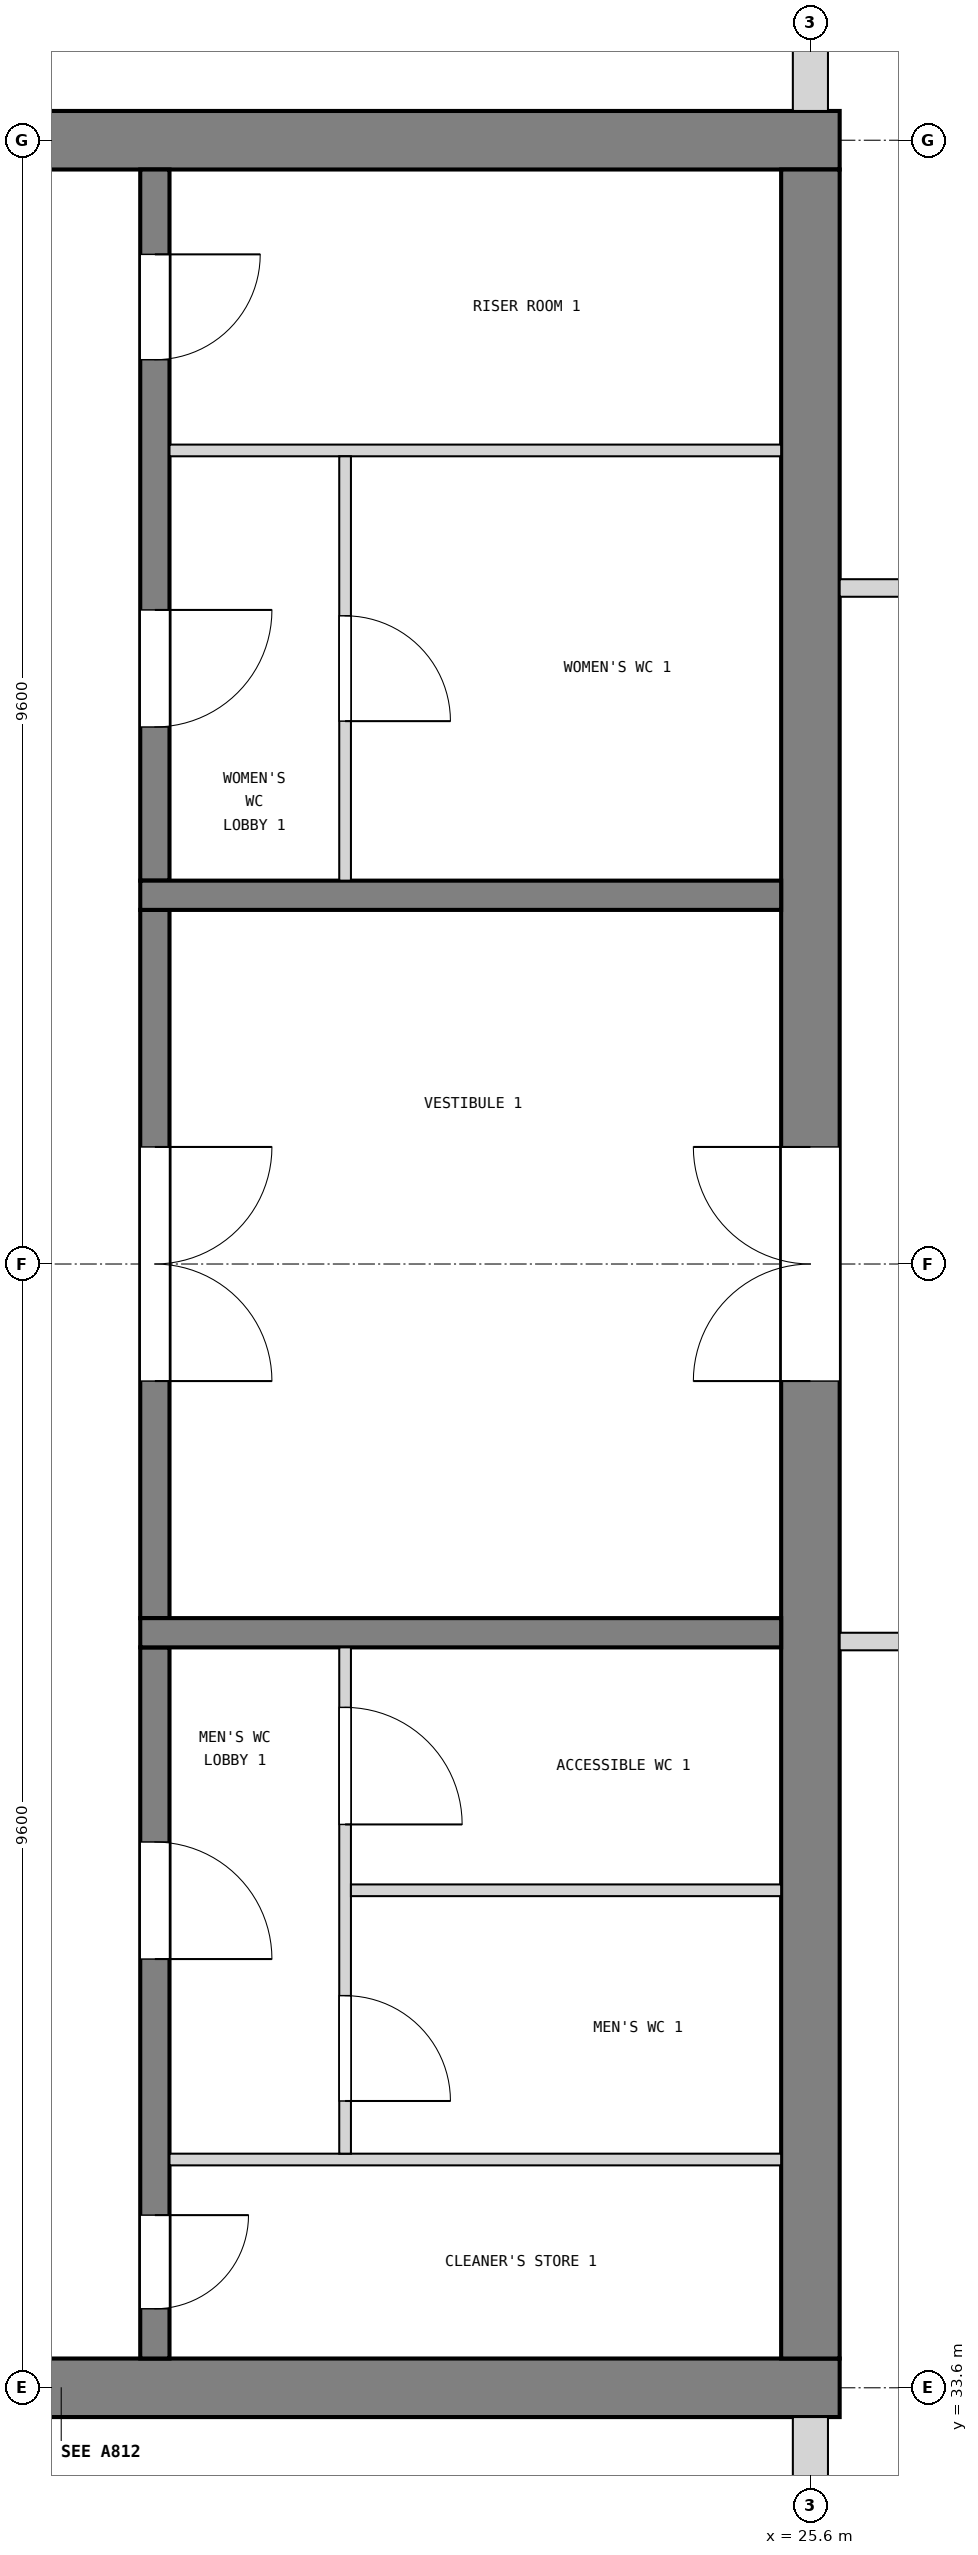
"""IFC4 building model, lengths in metres.
Left out: names, types, materials, properties, quantities, classifications, styles, units other than length and angle.
Written with IfcOpenShell. Run it as: python <this file> out.ifc"""

import sys

from ifc_helpers import new_model, si_unit, direction, frame, frame_2d, origin, place, context, subcontext, project, spatial, rectangle, extrude, element, fill, save


model = new_model("IFC4")
c1 = context("Model", 3, precision=1e-05, world=origin(), true_north=direction((0.0, 1.0)))
c2 = subcontext(c1, "Body", "Model", "MODEL_VIEW")
j1 = project(units=[si_unit("LENGTHUNIT", "METRE"), si_unit("PLANEANGLEUNIT", "RADIAN")], contexts=[c1])
p1 = place(None, origin())
s1 = spatial("IfcSite", under=j1, at=p1, CompositionType="ELEMENT")
p2 = place(p1, origin())
s2 = spatial("IfcBuilding", under=s1, at=p2, CompositionType="ELEMENT")
p3 = place(p2, frame((0.0, 0.0, 40.5)))
s3 = spatial("IfcBuildingStorey", under=s2, at=p3, CompositionType="ELEMENT", Elevation=40.5)
p4 = place(p3, frame((12.55, 52.8, 0.0), z_axis=(0.0, 0.0, 1.0), x_axis=(1.0, 0.0, 0.0)))
e1 = element("IfcWall", 1, at=p4, inside=s3, PredefinedType="SHEAR", context=c2, shape_type="SweptSolid", body=[
    extrude(rectangle(XDim=13.3, YDim=0.5, at=frame_2d((6.65, 0.0))), origin(), (0.0, 0.0, 1.0), 3.9),
])
p5 = place(p4, frame((1.85, 0.0, 1.0)))
e2 = element("IfcOpeningElement", 2, at=p5, cuts=e1, PredefinedType="OPENING", context=c2, shape_type="SweptSolid", body=[
    extrude(rectangle(XDim=0.4, YDim=2.0, at=frame_2d((0.2, 1.0))), frame((0.0, 0.26, 0.0), z_axis=(0.0, -1.0, 0.0), x_axis=(1.0, 0.0, 0.0)), (0.0, 0.0, 1.0), 0.52),
])
p6 = place(p3, frame((12.55, 33.6, 0.0), z_axis=(0.0, 0.0, 1.0), x_axis=(1.0, 0.0, 0.0)))
e3 = element("IfcWall", 3, at=p6, inside=s3, PredefinedType="SHEAR", context=c2, shape_type="SweptSolid", body=[
    extrude(rectangle(XDim=13.3, YDim=0.5, at=frame_2d((6.65, 0.0))), origin(), (0.0, 0.0, 1.0), 3.9),
])
p7 = place(p6, frame((1.85, 0.0, 1.0)))
e4 = element("IfcOpeningElement", 4, at=p7, cuts=e3, PredefinedType="OPENING", context=c2, shape_type="SweptSolid", body=[
    extrude(rectangle(XDim=0.4, YDim=2.0, at=frame_2d((0.2, 1.0))), frame((0.0, 0.26, 0.0), z_axis=(0.0, -1.0, 0.0), x_axis=(1.0, 0.0, 0.0)), (0.0, 0.0, 1.0), 0.52),
])
p8 = place(p3, frame((25.6, 33.85, 0.0), z_axis=(0.0, 0.0, 1.0), x_axis=(0.0, 1.0, 0.0)))
e5 = element("IfcWall", 5, at=p8, inside=s3, PredefinedType="SHEAR", context=c2, shape_type="SweptSolid", body=[
    extrude(rectangle(XDim=18.7, YDim=0.5, at=frame_2d((9.35, 0.0))), origin(), (0.0, 0.0, 1.0), 3.9),
])
p9 = place(p8, frame((8.35, 0.0, 0.0)))
e6 = element("IfcOpeningElement", 6, at=p9, cuts=e5, PredefinedType="OPENING", context=c2, shape_type="SweptSolid", body=[
    extrude(rectangle(XDim=2.0, YDim=2.1, at=frame_2d((1.0, 1.05))), frame((0.0, 0.26, 0.0), z_axis=(0.0, -1.0, 0.0), x_axis=(1.0, 0.0, 0.0)), (0.0, 0.0, 1.0), 0.52),
])
p10 = place(p3, frame((25.6, 31.0, 0.0), z_axis=(0.0, 0.0, 1.0), x_axis=(0.0, 1.0, 0.0)))
e7 = element("IfcWall", 7, at=p10, inside=s3, PredefinedType="SOLIDWALL", context=c2, shape_type="SweptSolid", body=[
    extrude(rectangle(XDim=2.35, YDim=0.3, at=frame_2d((1.175, 0.0))), origin(), (0.0, 0.0, 1.0), 2.88),
])
p11 = place(p3, frame((25.6, 53.05, 0.0), z_axis=(0.0, 0.0, 1.0), x_axis=(0.0, 1.0, 0.0)))
e8 = element("IfcWall", 8, at=p11, inside=s3, PredefinedType="SOLIDWALL", context=c2, shape_type="SweptSolid", body=[
    extrude(rectangle(XDim=2.35, YDim=0.3, at=frame_2d((1.175, 0.0))), origin(), (0.0, 0.0, 1.0), 2.88),
])
p12 = place(p3, frame((20.0, 33.85, 0.0), z_axis=(0.0, 0.0, 1.0), x_axis=(0.0, 1.0, 0.0)))
e9 = element("IfcWall", 9, at=p12, inside=s3, PredefinedType="SOLIDWALL", context=c2, shape_type="SweptSolid", body=[
    extrude(rectangle(XDim=6.075, YDim=0.25, at=frame_2d((3.038, 0.0))), origin(), (0.0, 0.0, 1.0), 3.6),
])
p13 = place(p12, frame((0.425, 0.0, 0.0)))
e10 = element("IfcOpeningElement", 10, at=p13, cuts=e9, PredefinedType="OPENING", context=c2, shape_type="SweptSolid", body=[
    extrude(rectangle(XDim=0.8, YDim=2.1, at=frame_2d((0.4, 1.05))), frame((0.0, 0.135, 0.0), z_axis=(0.0, -1.0, 0.0), x_axis=(1.0, 0.0, 0.0)), (0.0, 0.0, 1.0), 0.27),
])
p14 = place(p12, frame((3.413, 0.0, 0.0)))
e11 = element("IfcOpeningElement", 11, at=p14, cuts=e9, PredefinedType="OPENING", context=c2, shape_type="SweptSolid", body=[
    extrude(rectangle(XDim=1.0, YDim=2.1, at=frame_2d((0.5, 1.05))), frame((0.0, 0.135, 0.0), z_axis=(0.0, -1.0, 0.0), x_axis=(1.0, 0.0, 0.0)), (0.0, 0.0, 1.0), 0.27),
])
p15 = place(p3, frame((20.0, 40.175, 0.0), z_axis=(0.0, 0.0, 1.0), x_axis=(0.0, 1.0, 0.0)))
e12 = element("IfcWall", 12, at=p15, inside=s3, PredefinedType="SOLIDWALL", context=c2, shape_type="SweptSolid", body=[
    extrude(rectangle(XDim=6.05, YDim=0.25, at=frame_2d((3.025, 0.0))), origin(), (0.0, 0.0, 1.0), 3.6),
])
p16 = place(p15, frame((2.025, 0.0, 0.0)))
e13 = element("IfcOpeningElement", 13, at=p16, cuts=e12, PredefinedType="OPENING", context=c2, shape_type="SweptSolid", body=[
    extrude(rectangle(XDim=2.0, YDim=2.1, at=frame_2d((1.0, 1.05))), frame((0.0, 0.135, 0.0), z_axis=(0.0, -1.0, 0.0), x_axis=(1.0, 0.0, 0.0)), (0.0, 0.0, 1.0), 0.27),
])
p17 = place(p3, frame((20.0, 46.475, 0.0), z_axis=(0.0, 0.0, 1.0), x_axis=(0.0, 1.0, 0.0)))
e14 = element("IfcWall", 14, at=p17, inside=s3, PredefinedType="SOLIDWALL", context=c2, shape_type="SweptSolid", body=[
    extrude(rectangle(XDim=6.075, YDim=0.25, at=frame_2d((3.038, 0.0))), origin(), (0.0, 0.0, 1.0), 3.6),
])
p18 = place(p17, frame((1.312, 0.0, 0.0)))
e15 = element("IfcOpeningElement", 15, at=p18, cuts=e14, PredefinedType="OPENING", context=c2, shape_type="SweptSolid", body=[
    extrude(rectangle(XDim=1.0, YDim=2.1, at=frame_2d((0.5, 1.05))), frame((0.0, 0.135, 0.0), z_axis=(0.0, -1.0, 0.0), x_axis=(1.0, 0.0, 0.0)), (0.0, 0.0, 1.0), 0.27),
])
p19 = place(p17, frame((4.45, 0.0, 0.0)))
e16 = element("IfcOpeningElement", 16, at=p19, cuts=e14, PredefinedType="OPENING", context=c2, shape_type="SweptSolid", body=[
    extrude(rectangle(XDim=0.9, YDim=2.1, at=frame_2d((0.45, 1.05))), frame((0.0, 0.135, 0.0), z_axis=(0.0, -1.0, 0.0), x_axis=(1.0, 0.0, 0.0)), (0.0, 0.0, 1.0), 0.27),
])
for number, where, z_axis, x_axis in (
    (17, (19.875, 40.05, 0.0), (0.0, 0.0, 1.0), (1.0, 0.0, 0.0)),
    (18, (19.875, 46.35, 0.0), (0.0, 0.0, 1.0), (1.0, 0.0, 0.0)),
):
    element("IfcWall", number, at=place(p3, frame(where, z_axis=z_axis, x_axis=x_axis)), inside=s3, PredefinedType="SOLIDWALL", context=c2, shape_type="SweptSolid", body=[
        extrude(rectangle(XDim=5.475, YDim=0.25, at=frame_2d((2.738, 0.0))), origin(), (0.0, 0.0, 1.0), 3.6),
    ])
p20 = place(p3, frame((20.125, 35.55, 0.0), z_axis=(0.0, 0.0, 1.0), x_axis=(1.0, 0.0, 0.0)))
e19 = element("IfcWall", 19, at=p20, inside=s3, PredefinedType="PARTITIONING", context=c2, shape_type="SweptSolid", body=[
    extrude(rectangle(XDim=5.225, YDim=0.1, at=frame_2d((2.613, 0.0))), origin(), (0.0, 0.0, 1.0), 3.6),
])
p21 = place(p3, frame((21.625, 35.6, 0.0), z_axis=(0.0, 0.0, 1.0), x_axis=(0.0, 1.0, 0.0)))
e20 = element("IfcWall", 20, at=p21, inside=s3, PredefinedType="PARTITIONING", context=c2, shape_type="SweptSolid", body=[
    extrude(rectangle(XDim=4.325, YDim=0.1, at=frame_2d((2.163, 0.0))), origin(), (0.0, 0.0, 1.0), 3.6),
])
p22 = place(p21, frame((0.45, 0.0, 0.0)))
e21 = element("IfcOpeningElement", 21, at=p22, cuts=e20, PredefinedType="OPENING", context=c2, shape_type="SweptSolid", body=[
    extrude(rectangle(XDim=0.9, YDim=2.1, at=frame_2d((0.45, 1.05))), frame((0.0, 0.06, 0.0), z_axis=(0.0, -1.0, 0.0), x_axis=(1.0, 0.0, 0.0)), (0.0, 0.0, 1.0), 0.12),
])
p23 = place(p21, frame((2.812, 0.0, 0.0)))
e22 = element("IfcOpeningElement", 22, at=p23, cuts=e20, PredefinedType="OPENING", context=c2, shape_type="SweptSolid", body=[
    extrude(rectangle(XDim=1.0, YDim=2.1, at=frame_2d((0.5, 1.05))), frame((0.0, 0.06, 0.0), z_axis=(0.0, -1.0, 0.0), x_axis=(1.0, 0.0, 0.0)), (0.0, 0.0, 1.0), 0.12),
])
p24 = place(p3, frame((21.675, 37.85, 0.0), z_axis=(0.0, 0.0, 1.0), x_axis=(1.0, 0.0, 0.0)))
e23 = element("IfcWall", 23, at=p24, inside=s3, PredefinedType="PARTITIONING", context=c2, shape_type="SweptSolid", body=[
    extrude(rectangle(XDim=3.675, YDim=0.1, at=frame_2d((1.837, 0.0))), origin(), (0.0, 0.0, 1.0), 3.6),
])
p25 = place(p3, frame((20.125, 50.15, 0.0), z_axis=(0.0, 0.0, 1.0), x_axis=(1.0, 0.0, 0.0)))
e24 = element("IfcWall", 24, at=p25, inside=s3, PredefinedType="PARTITIONING", context=c2, shape_type="SweptSolid", body=[
    extrude(rectangle(XDim=5.225, YDim=0.1, at=frame_2d((2.613, 0.0))), origin(), (0.0, 0.0, 1.0), 3.6),
])
p26 = place(p3, frame((21.625, 46.475, 0.0), z_axis=(0.0, 0.0, 1.0), x_axis=(0.0, 1.0, 0.0)))
e25 = element("IfcWall", 25, at=p26, inside=s3, PredefinedType="PARTITIONING", context=c2, shape_type="SweptSolid", body=[
    extrude(rectangle(XDim=3.625, YDim=0.1, at=frame_2d((1.812, 0.0))), origin(), (0.0, 0.0, 1.0), 3.6),
])
p27 = place(p26, frame((1.363, 0.0, 0.0)))
e26 = element("IfcOpeningElement", 26, at=p27, cuts=e25, PredefinedType="OPENING", context=c2, shape_type="SweptSolid", body=[
    extrude(rectangle(XDim=0.9, YDim=2.1, at=frame_2d((0.45, 1.05))), frame((0.0, 0.06, 0.0), z_axis=(0.0, -1.0, 0.0), x_axis=(1.0, 0.0, 0.0)), (0.0, 0.0, 1.0), 0.12),
])
p28 = place(p3, frame((25.85, 48.975, 0.0), z_axis=(0.0, 0.0, 1.0), x_axis=(1.0, 0.0, 0.0)))
e27 = element("IfcWall", 27, at=p28, inside=s3, PredefinedType="PARTITIONING", context=c2, shape_type="SweptSolid", body=[
    extrude(rectangle(XDim=5.97, YDim=0.15, at=frame_2d((2.985, 0.0))), origin(), (0.0, 0.0, 1.0), 3.68),
])
p29 = place(p28, frame((2.45, 0.0, 0.0)))
e28 = element("IfcOpeningElement", 28, at=p29, cuts=e27, PredefinedType="OPENING", context=c2, shape_type="SweptSolid", body=[
    extrude(rectangle(XDim=1.0, YDim=2.1, at=frame_2d((0.5, 1.05))), frame((0.0, 0.085, 0.0), z_axis=(0.0, -1.0, 0.0), x_axis=(1.0, 0.0, 0.0)), (0.0, 0.0, 1.0), 0.17),
])
p30 = place(p3, frame((25.85, 39.975, 0.0), z_axis=(0.0, 0.0, 1.0), x_axis=(1.0, 0.0, 0.0)))
e29 = element("IfcWall", 29, at=p30, inside=s3, PredefinedType="PARTITIONING", context=c2, shape_type="SweptSolid", body=[
    extrude(rectangle(XDim=5.97, YDim=0.15, at=frame_2d((2.985, 0.0))), origin(), (0.0, 0.0, 1.0), 3.68),
])
p31 = place(p30, frame((2.45, 0.0, 0.0)))
e30 = element("IfcOpeningElement", 30, at=p31, cuts=e29, PredefinedType="OPENING", context=c2, shape_type="SweptSolid", body=[
    extrude(rectangle(XDim=1.0, YDim=2.1, at=frame_2d((0.5, 1.05))), frame((0.0, 0.085, 0.0), z_axis=(0.0, -1.0, 0.0), x_axis=(1.0, 0.0, 0.0)), (0.0, 0.0, 1.0), 0.17),
])
p32 = place(p16, frame((2.0, 0.0, 0.0), z_axis=(0.0, 0.0, 1.0), x_axis=(-1.0, 0.0, 0.0)))
e31 = element("IfcDoor", 31, at=p32, inside=s3, OperationType="DOUBLE_DOOR_SINGLE_SWING", PredefinedType="DOOR", context=c2, shape_type="SweptSolid", body=[
    extrude(rectangle(XDim=2.0, YDim=2.1, at=frame_2d((1.0, 1.05))), frame((0.0, 0.025, 0.0), z_axis=(0.0, -1.0, 0.0), x_axis=(1.0, 0.0, 0.0)), (0.0, 0.0, 1.0), 0.05),
])
fill(e13, e31)
p33 = place(p9, origin())
e32 = element("IfcDoor", 32, at=p33, inside=s3, OperationType="DOUBLE_DOOR_SINGLE_SWING", PredefinedType="DOOR", context=c2, shape_type="SweptSolid", body=[
    extrude(rectangle(XDim=2.0, YDim=2.1, at=frame_2d((1.0, 1.05))), frame((0.0, 0.025, 0.0), z_axis=(0.0, -1.0, 0.0), x_axis=(1.0, 0.0, 0.0)), (0.0, 0.0, 1.0), 0.05),
])
fill(e6, e32)
p34 = place(p13, frame((0.8, 0.0, 0.0), z_axis=(0.0, 0.0, 1.0), x_axis=(-1.0, 0.0, 0.0)))
e33 = element("IfcDoor", 33, at=p34, inside=s3, OperationType="SINGLE_SWING_LEFT", PredefinedType="DOOR", context=c2, shape_type="SweptSolid", body=[
    extrude(rectangle(XDim=0.8, YDim=2.1, at=frame_2d((0.4, 1.05))), frame((0.0, 0.025, 0.0), z_axis=(0.0, -1.0, 0.0), x_axis=(1.0, 0.0, 0.0)), (0.0, 0.0, 1.0), 0.05),
])
fill(e10, e33)
p35 = place(p14, frame((1.0, 0.0, 0.0), z_axis=(0.0, 0.0, 1.0), x_axis=(-1.0, 0.0, 0.0)))
e34 = element("IfcDoor", 34, at=p35, inside=s3, OperationType="SINGLE_SWING_RIGHT", PredefinedType="DOOR", context=c2, shape_type="SweptSolid", body=[
    extrude(rectangle(XDim=1.0, YDim=2.1, at=frame_2d((0.5, 1.05))), frame((0.0, 0.025, 0.0), z_axis=(0.0, -1.0, 0.0), x_axis=(1.0, 0.0, 0.0)), (0.0, 0.0, 1.0), 0.05),
])
fill(e11, e34)
p36 = place(p22, frame((0.9, 0.0, 0.0), z_axis=(0.0, 0.0, 1.0), x_axis=(-1.0, 0.0, 0.0)))
e35 = element("IfcDoor", 35, at=p36, inside=s3, OperationType="SINGLE_SWING_RIGHT", PredefinedType="DOOR", context=c2, shape_type="SweptSolid", body=[
    extrude(rectangle(XDim=0.9, YDim=2.1, at=frame_2d((0.45, 1.05))), frame((0.0, 0.025, 0.0), z_axis=(0.0, -1.0, 0.0), x_axis=(1.0, 0.0, 0.0)), (0.0, 0.0, 1.0), 0.05),
])
fill(e21, e35)
p37 = place(p23, frame((1.0, 0.0, 0.0), z_axis=(0.0, 0.0, 1.0), x_axis=(-1.0, 0.0, 0.0)))
e36 = element("IfcDoor", 36, at=p37, inside=s3, OperationType="SINGLE_SWING_RIGHT", PredefinedType="DOOR", context=c2, shape_type="SweptSolid", body=[
    extrude(rectangle(XDim=1.0, YDim=2.1, at=frame_2d((0.5, 1.05))), frame((0.0, 0.025, 0.0), z_axis=(0.0, -1.0, 0.0), x_axis=(1.0, 0.0, 0.0)), (0.0, 0.0, 1.0), 0.05),
])
fill(e22, e36)
p38 = place(p18, frame((1.0, 0.0, 0.0), z_axis=(0.0, 0.0, 1.0), x_axis=(-1.0, 0.0, 0.0)))
e37 = element("IfcDoor", 37, at=p38, inside=s3, OperationType="SINGLE_SWING_LEFT", PredefinedType="DOOR", context=c2, shape_type="SweptSolid", body=[
    extrude(rectangle(XDim=1.0, YDim=2.1, at=frame_2d((0.5, 1.05))), frame((0.0, 0.025, 0.0), z_axis=(0.0, -1.0, 0.0), x_axis=(1.0, 0.0, 0.0)), (0.0, 0.0, 1.0), 0.05),
])
fill(e15, e37)
p39 = place(p27, frame((0.9, 0.0, 0.0), z_axis=(0.0, 0.0, 1.0), x_axis=(-1.0, 0.0, 0.0)))
e38 = element("IfcDoor", 38, at=p39, inside=s3, OperationType="SINGLE_SWING_RIGHT", PredefinedType="DOOR", context=c2, shape_type="SweptSolid", body=[
    extrude(rectangle(XDim=0.9, YDim=2.1, at=frame_2d((0.45, 1.05))), frame((0.0, 0.025, 0.0), z_axis=(0.0, -1.0, 0.0), x_axis=(1.0, 0.0, 0.0)), (0.0, 0.0, 1.0), 0.05),
])
fill(e26, e38)
p40 = place(p19, frame((0.9, 0.0, 0.0), z_axis=(0.0, 0.0, 1.0), x_axis=(-1.0, 0.0, 0.0)))
e39 = element("IfcDoor", 39, at=p40, inside=s3, OperationType="SINGLE_SWING_LEFT", PredefinedType="DOOR", context=c2, shape_type="SweptSolid", body=[
    extrude(rectangle(XDim=0.9, YDim=2.1, at=frame_2d((0.45, 1.05))), frame((0.0, 0.025, 0.0), z_axis=(0.0, -1.0, 0.0), x_axis=(1.0, 0.0, 0.0)), (0.0, 0.0, 1.0), 0.05),
])
fill(e16, e39)
save(model, sys.argv[1])
